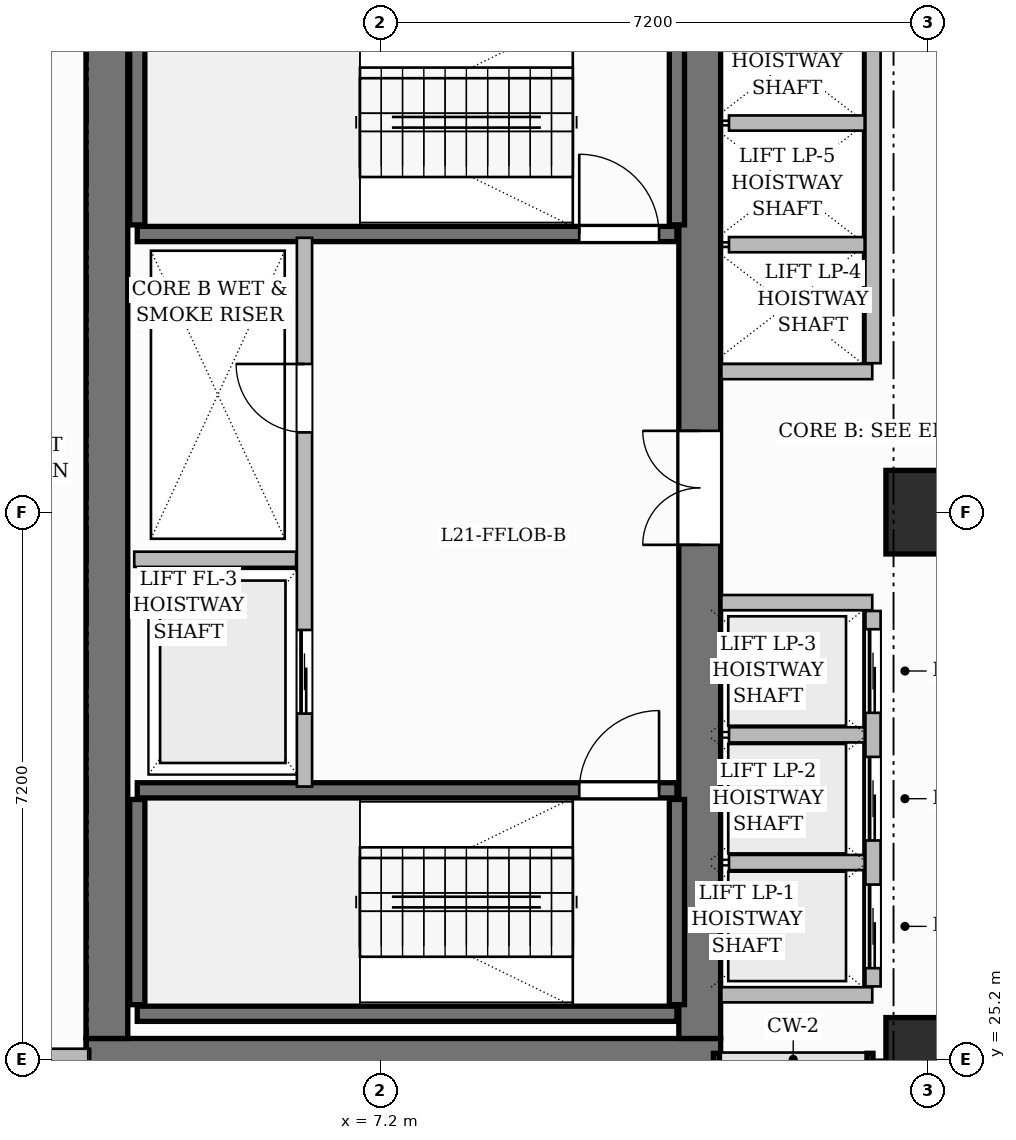
"""IFC4 building model, lengths in metres.
Left out: names, types, materials, properties, quantities, classifications, styles, units other than length and angle.
Written with IfcOpenShell. Run it as: python <this file> out.ifc"""

import sys

from ifc_helpers import new_model, si_unit, direction, frame, frame_2d, origin, origin_2d, place, context, subcontext, project, spatial, rectangle, extrude, source, transform, mapped, element, fill, save


model = new_model("IFC4")
c1 = context("Model", 3, precision=1e-05, world=origin(), true_north=direction((0.0, 1.0)))
c2 = subcontext(c1, "Body", "Model", "MODEL_VIEW")
j1 = project(units=[si_unit("LENGTHUNIT", "METRE"), si_unit("PLANEANGLEUNIT", "RADIAN")], contexts=[c1])
p1 = place(None, origin())
s1 = spatial("IfcSite", under=j1, at=p1, CompositionType="ELEMENT")
p2 = place(p1, origin())
s2 = spatial("IfcBuilding", under=s1, at=p2, CompositionType="ELEMENT")
p3 = place(p2, frame((0.0, 0.0, 87.9)))
s3 = spatial("IfcBuildingStorey", under=s2, at=p3, CompositionType="ELEMENT", Elevation=87.9)
p4 = place(p3, frame((3.325, 25.2, 0.0), z_axis=(0.0, 0.0, 1.0), x_axis=(1.0, 0.0, 0.0)))
e1 = element("IfcWall", 1, at=p4, inside=s3, PredefinedType="SHEAR", context=c2, shape_type="SweptSolid", body=[
    extrude(rectangle(XDim=8.35, YDim=0.55, at=frame_2d((4.175, 0.0))), origin(), (0.0, 0.0, 1.0), 3.7),
])
p5 = place(p3, frame((3.6, 25.475, 0.0), z_axis=(0.0, 0.0, 1.0), x_axis=(0.0, 1.0, 0.0)))
e2 = element("IfcWall", 2, at=p5, inside=s3, PredefinedType="SHEAR", context=c2, shape_type="SweptSolid", body=[
    extrude(rectangle(XDim=13.85, YDim=0.55, at=frame_2d((6.925, 0.0))), origin(), (0.0, 0.0, 1.0), 3.7),
])
p6 = place(p3, frame((11.4, 25.475, 0.0), z_axis=(0.0, 0.0, 1.0), x_axis=(0.0, 1.0, 0.0)))
e3 = element("IfcWall", 3, at=p6, inside=s3, PredefinedType="SHEAR", context=c2, shape_type="SweptSolid", body=[
    extrude(rectangle(XDim=13.85, YDim=0.55, at=frame_2d((6.925, 0.0))), origin(), (0.0, 0.0, 1.0), 3.7),
])
p7 = place(p6, frame((6.495, 0.0, 0.0)))
e4 = element("IfcOpeningElement", 4, at=p7, cuts=e3, PredefinedType="OPENING", context=c2, shape_type="SweptSolid", body=[
    extrude(rectangle(XDim=1.5, YDim=2.2, at=frame_2d((0.75, 1.1))), frame((0.0, 0.285, 0.0), z_axis=(0.0, -1.0, 0.0), x_axis=(1.0, 0.0, 0.0)), (0.0, 0.0, 1.0), 0.57),
])
m1 = source(origin(), c2, "Body", "SweptSolid", [
    extrude(rectangle(XDim=1.1, YDim=1.1, at=origin_2d()), origin(), (0.0, 0.0, 1.0), 3.7),
])
for number, where, z_axis, x_axis in (
    (5, (14.4, 25.2, 0.0), (0.0, 0.0, 1.0), (1.0, 0.0, 0.0)),
    (6, (14.4, 32.4, 0.0), (0.0, 0.0, 1.0), (1.0, 0.0, 0.0)),
):
    element("IfcColumn", number, at=place(p3, frame(where, z_axis=z_axis, x_axis=x_axis)), inside=s3, PredefinedType="COLUMN", context=c2, shape_type="MappedRepresentation", body=[
        mapped(m1, transform((0.0, 0.0, 0.0), scale=1.0)),
    ])
p8 = place(p3, frame((4.0, 25.8, 0.0), z_axis=(0.0, 0.0, 1.0), x_axis=(1.0, 0.0, 0.0)))
e7 = element("IfcWall", 7, at=p8, inside=s3, PredefinedType="SHEAR", context=c2, shape_type="SweptSolid", body=[
    extrude(rectangle(XDim=7.1, YDim=0.2, at=frame_2d((3.55, 0.0))), origin(), (0.0, 0.0, 1.0), 3.7),
])
for number, where, z_axis, x_axis in (
    (8, (4.0, 25.92, 0.0), (0.0, 0.0, 1.0), (0.0, 1.0, 0.0)),
    (9, (11.1, 25.92, 0.0), (0.0, 0.0, 1.0), (0.0, 1.0, 0.0)),
):
    element("IfcWall", number, at=place(p3, frame(where, z_axis=z_axis, x_axis=x_axis)), inside=s3, PredefinedType="SHEAR", context=c2, shape_type="SweptSolid", body=[
        extrude(rectangle(XDim=2.7, YDim=0.2, at=frame_2d((1.35, 0.0))), origin(), (0.0, 0.0, 1.0), 3.7),
    ])
p9 = place(p3, frame((4.0, 28.74, 0.0), z_axis=(0.0, 0.0, 1.0), x_axis=(1.0, 0.0, 0.0)))
e10 = element("IfcWall", 10, at=p9, inside=s3, PredefinedType="SHEAR", context=c2, shape_type="SweptSolid", body=[
    extrude(rectangle(XDim=7.1, YDim=0.2, at=frame_2d((3.55, 0.0))), origin(), (0.0, 0.0, 1.0), 3.7),
])
p10 = place(p9, frame((5.815, 0.0, 0.0)))
e11 = element("IfcOpeningElement", 11, at=p10, cuts=e10, PredefinedType="OPENING", context=c2, shape_type="SweptSolid", body=[
    extrude(rectangle(XDim=1.05, YDim=2.2, at=frame_2d((0.525, 1.1))), frame((0.0, 0.11, 0.0), z_axis=(0.0, -1.0, 0.0), x_axis=(1.0, 0.0, 0.0)), (0.0, 0.0, 1.0), 0.22),
])
for number, where, z_axis, x_axis in (
    (12, (4.0, 36.18, 0.0), (0.0, 0.0, 1.0), (0.0, 1.0, 0.0)),
    (13, (11.1, 36.18, 0.0), (0.0, 0.0, 1.0), (0.0, 1.0, 0.0)),
):
    element("IfcWall", number, at=place(p3, frame(where, z_axis=z_axis, x_axis=x_axis)), inside=s3, PredefinedType="SHEAR", context=c2, shape_type="SweptSolid", body=[
        extrude(rectangle(XDim=2.7, YDim=0.2, at=frame_2d((1.35, 0.0))), origin(), (0.0, 0.0, 1.0), 3.7),
    ])
p11 = place(p3, frame((4.0, 36.06, 0.0), z_axis=(0.0, 0.0, 1.0), x_axis=(1.0, 0.0, 0.0)))
e14 = element("IfcWall", 14, at=p11, inside=s3, PredefinedType="SHEAR", context=c2, shape_type="SweptSolid", body=[
    extrude(rectangle(XDim=7.1, YDim=0.2, at=frame_2d((3.55, 0.0))), origin(), (0.0, 0.0, 1.0), 3.7),
])
p12 = place(p11, frame((5.815, 0.0, 0.0)))
e15 = element("IfcOpeningElement", 15, at=p12, cuts=e14, PredefinedType="OPENING", context=c2, shape_type="SweptSolid", body=[
    extrude(rectangle(XDim=1.05, YDim=2.2, at=frame_2d((0.525, 1.1))), frame((0.0, 0.11, 0.0), z_axis=(0.0, -1.0, 0.0), x_axis=(1.0, 0.0, 0.0)), (0.0, 0.0, 1.0), 0.22),
])
p13 = place(p3, frame((6.2, 28.79, 0.0), z_axis=(0.0, 0.0, 1.0), x_axis=(0.0, 1.0, 0.0)))
e16 = element("IfcWall", 16, at=p13, inside=s3, PredefinedType="PARTITIONING", context=c2, shape_type="SweptSolid", body=[
    extrude(rectangle(XDim=7.22, YDim=0.2, at=frame_2d((3.61, 0.0))), origin(), (0.0, 0.0, 1.0), 3.45),
])
p14 = place(p13, frame((4.66, 0.0, 0.0)))
e17 = element("IfcOpeningElement", 17, at=p14, cuts=e16, PredefinedType="OPENING", context=c2, shape_type="SweptSolid", body=[
    extrude(rectangle(XDim=0.9, YDim=2.1, at=frame_2d((0.45, 1.05))), frame((0.0, 0.11, 0.0), z_axis=(0.0, -1.0, 0.0), x_axis=(1.0, 0.0, 0.0)), (0.0, 0.0, 1.0), 0.22),
])
p15 = place(p13, frame((0.96, 0.0, 0.0)))
e18 = element("IfcOpeningElement", 18, at=p15, cuts=e16, PredefinedType="OPENING", context=c2, shape_type="SweptSolid", body=[
    extrude(rectangle(XDim=1.1, YDim=2.2, at=frame_2d((0.55, 1.1))), frame((0.0, 0.11, 0.0), z_axis=(0.0, -1.0, 0.0), x_axis=(1.0, 0.0, 0.0)), (0.0, 0.0, 1.0), 0.22),
])
p16 = place(p3, frame((3.96, 31.78, 0.0), z_axis=(0.0, 0.0, 1.0), x_axis=(1.0, 0.0, 0.0)))
e19 = element("IfcWall", 19, at=p16, inside=s3, PredefinedType="PARTITIONING", context=c2, shape_type="SweptSolid", body=[
    extrude(rectangle(XDim=2.13, YDim=0.2, at=frame_2d((1.065, 0.0))), origin(), (0.0, 0.0, 1.0), 3.45),
])
for number, where, z_axis, x_axis in (
    (20, (11.685, 26.05, 0.0), (0.0, 0.0, 1.0), (1.0, 0.0, 0.0)),
    (21, (11.685, 31.21, 0.0), (0.0, 0.0, 1.0), (1.0, 0.0, 0.0)),
):
    element("IfcWall", number, at=place(p3, frame(where, z_axis=z_axis, x_axis=x_axis)), inside=s3, PredefinedType="PARTITIONING", context=c2, shape_type="SweptSolid", body=[
        extrude(rectangle(XDim=1.985, YDim=0.2, at=frame_2d((0.992, 0.0))), origin(), (0.0, 0.0, 1.0), 3.45),
    ])
p17 = place(p3, frame((13.68, 26.16, 0.0), z_axis=(0.0, 0.0, 1.0), x_axis=(0.0, 1.0, 0.0)))
e22 = element("IfcWall", 22, at=p17, inside=s3, PredefinedType="PARTITIONING", context=c2, shape_type="SweptSolid", body=[
    extrude(rectangle(XDim=4.94, YDim=0.2, at=frame_2d((2.47, 0.0))), origin(), (0.0, 0.0, 1.0), 3.45),
])
p18 = place(p17, frame((0.24, 0.0, 0.0)))
e23 = element("IfcOpeningElement", 23, at=p18, cuts=e22, PredefinedType="OPENING", context=c2, shape_type="SweptSolid", body=[
    extrude(rectangle(XDim=1.1, YDim=2.2, at=frame_2d((0.55, 1.1))), frame((0.0, 0.11, 0.0), z_axis=(0.0, -1.0, 0.0), x_axis=(1.0, 0.0, 0.0)), (0.0, 0.0, 1.0), 0.22),
])
p19 = place(p17, frame((1.92, 0.0, 0.0)))
e24 = element("IfcOpeningElement", 24, at=p19, cuts=e22, PredefinedType="OPENING", context=c2, shape_type="SweptSolid", body=[
    extrude(rectangle(XDim=1.1, YDim=2.2, at=frame_2d((0.55, 1.1))), frame((0.0, 0.11, 0.0), z_axis=(0.0, -1.0, 0.0), x_axis=(1.0, 0.0, 0.0)), (0.0, 0.0, 1.0), 0.22),
])
p20 = place(p17, frame((3.6, 0.0, 0.0)))
e25 = element("IfcOpeningElement", 25, at=p20, cuts=e22, PredefinedType="OPENING", context=c2, shape_type="SweptSolid", body=[
    extrude(rectangle(XDim=1.1, YDim=2.2, at=frame_2d((0.55, 1.1))), frame((0.0, 0.11, 0.0), z_axis=(0.0, -1.0, 0.0), x_axis=(1.0, 0.0, 0.0)), (0.0, 0.0, 1.0), 0.22),
])
for number, where, z_axis, x_axis in (
    (26, (11.785, 27.79, 0.0), (0.0, 0.0, 1.0), (1.0, 0.0, 0.0)),
    (27, (11.785, 29.47, 0.0), (0.0, 0.0, 1.0), (1.0, 0.0, 0.0)),
):
    element("IfcWall", number, at=place(p3, frame(where, z_axis=z_axis, x_axis=x_axis)), inside=s3, PredefinedType="PARTITIONING", context=c2, shape_type="SweptSolid", body=[
        extrude(rectangle(XDim=1.785, YDim=0.2, at=frame_2d((0.893, 0.0))), origin(), (0.0, 0.0, 1.0), 3.45),
    ])
p21 = place(p3, frame((11.685, 34.25, 0.0), z_axis=(0.0, 0.0, 1.0), x_axis=(1.0, 0.0, 0.0)))
e28 = element("IfcWall", 28, at=p21, inside=s3, PredefinedType="PARTITIONING", context=c2, shape_type="SweptSolid", body=[
    extrude(rectangle(XDim=1.985, YDim=0.2, at=frame_2d((0.992, 0.0))), origin(), (0.0, 0.0, 1.0), 3.45),
])
p22 = place(p3, frame((13.68, 34.36, 0.0), z_axis=(0.0, 0.0, 1.0), x_axis=(0.0, 1.0, 0.0)))
e29 = element("IfcWall", 29, at=p22, inside=s3, PredefinedType="PARTITIONING", context=c2, shape_type="SweptSolid", body=[
    extrude(rectangle(XDim=4.72, YDim=0.2, at=frame_2d((2.36, 0.0))), origin(), (0.0, 0.0, 1.0), 3.45),
])
for number, where, z_axis, x_axis in (
    (30, (11.785, 35.92, 0.0), (0.0, 0.0, 1.0), (1.0, 0.0, 0.0)),
    (31, (11.785, 37.52, 0.0), (0.0, 0.0, 1.0), (1.0, 0.0, 0.0)),
):
    element("IfcWall", number, at=place(p3, frame(where, z_axis=z_axis, x_axis=x_axis)), inside=s3, PredefinedType="PARTITIONING", context=c2, shape_type="SweptSolid", body=[
        extrude(rectangle(XDim=1.785, YDim=0.2, at=frame_2d((0.893, 0.0))), origin(), (0.0, 0.0, 1.0), 3.45),
    ])
p23 = place(p3, frame((0.0, 25.2, 0.0), z_axis=(0.0, 0.0, 1.0), x_axis=(1.0, 0.0, 0.0)))
e32 = element("IfcWall", 32, at=p23, inside=s3, PredefinedType="SOLIDWALL", context=c2, shape_type="SweptSolid", body=[
    extrude(rectangle(XDim=3.38, YDim=0.28, at=frame_2d((1.69, 0.0))), origin(), (0.0, 0.0, 1.0), 3.45),
])
p24 = place(p23, frame((1.205, 0.0, 0.8)))
e33 = element("IfcOpeningElement", 33, at=p24, cuts=e32, PredefinedType="OPENING", context=c2, shape_type="SweptSolid", body=[
    extrude(rectangle(XDim=1.4, YDim=1.85, at=frame_2d((0.7, 0.925))), frame((0.0, 0.15, 0.0), z_axis=(0.0, -1.0, 0.0), x_axis=(1.0, 0.0, 0.0)), (0.0, 0.0, 1.0), 0.3),
])
m2 = source(origin(), c2, "Body", "SweptSolid", [
    extrude(rectangle(XDim=1.05, YDim=2.2, at=frame_2d((0.525, 1.1))), frame((0.0, 0.025, 0.0), z_axis=(0.0, -1.0, 0.0), x_axis=(1.0, 0.0, 0.0)), (0.0, 0.0, 1.0), 0.05),
])
p25 = place(p10, origin())
e34 = element("IfcDoor", 34, at=p25, inside=s3, OperationType="SINGLE_SWING_RIGHT", PredefinedType="DOOR", context=c2, shape_type="MappedRepresentation", body=[
    mapped(m2, transform((0.0, 0.0, 0.0), scale=1.0)),
])
fill(e11, e34)
p26 = place(p12, origin())
e35 = element("IfcDoor", 35, at=p26, inside=s3, OperationType="SINGLE_SWING_LEFT", PredefinedType="DOOR", context=c2, shape_type="MappedRepresentation", body=[
    mapped(m2, transform((0.0, 0.0, 0.0), scale=1.0)),
])
fill(e15, e35)
m3 = source(origin(), c2, "Body", "SweptSolid", [
    extrude(rectangle(XDim=0.9, YDim=2.1, at=frame_2d((0.45, 1.05))), frame((0.0, 0.025, 0.0), z_axis=(0.0, -1.0, 0.0), x_axis=(1.0, 0.0, 0.0)), (0.0, 0.0, 1.0), 0.05),
])
p27 = place(p14, origin())
e36 = element("IfcDoor", 36, at=p27, inside=s3, OperationType="SINGLE_SWING_RIGHT", PredefinedType="DOOR", context=c2, shape_type="MappedRepresentation", body=[
    mapped(m3, transform((0.0, 0.0, 0.0), scale=1.0)),
])
fill(e17, e36)
m4 = source(origin(), c2, "Body", "SweptSolid", [
    extrude(rectangle(XDim=1.5, YDim=2.2, at=frame_2d((0.75, 1.1))), frame((0.0, 0.025, 0.0), z_axis=(0.0, -1.0, 0.0), x_axis=(1.0, 0.0, 0.0)), (0.0, 0.0, 1.0), 0.05),
])
p28 = place(p7, origin())
e37 = element("IfcDoor", 37, at=p28, inside=s3, OperationType="DOUBLE_DOOR_SINGLE_SWING", PredefinedType="DOOR", context=c2, shape_type="MappedRepresentation", body=[
    mapped(m4, transform((0.0, 0.0, 0.0), scale=1.0)),
])
fill(e4, e37)
m5 = source(origin(), c2, "Body", "SweptSolid", [
    extrude(rectangle(XDim=1.1, YDim=2.2, at=frame_2d((0.55, 1.1))), frame((0.0, 0.025, 0.0), z_axis=(0.0, -1.0, 0.0), x_axis=(1.0, 0.0, 0.0)), (0.0, 0.0, 1.0), 0.05),
])
p29 = place(p15, origin())
e38 = element("IfcDoor", 38, at=p29, inside=s3, OperationType="SLIDING_TO_LEFT", PredefinedType="DOOR", context=c2, shape_type="MappedRepresentation", body=[
    mapped(m5, transform((0.0, 0.0, 0.0), scale=1.0)),
])
fill(e18, e38)
p30 = place(p18, origin())
e39 = element("IfcDoor", 39, at=p30, inside=s3, OperationType="SLIDING_TO_LEFT", PredefinedType="DOOR", context=c2, shape_type="MappedRepresentation", body=[
    mapped(m5, transform((0.0, 0.0, 0.0), scale=1.0)),
])
fill(e23, e39)
p31 = place(p19, origin())
e40 = element("IfcDoor", 40, at=p31, inside=s3, OperationType="SLIDING_TO_LEFT", PredefinedType="DOOR", context=c2, shape_type="MappedRepresentation", body=[
    mapped(m5, transform((0.0, 0.0, 0.0), scale=1.0)),
])
fill(e24, e40)
p32 = place(p20, origin())
e41 = element("IfcDoor", 41, at=p32, inside=s3, OperationType="SLIDING_TO_LEFT", PredefinedType="DOOR", context=c2, shape_type="MappedRepresentation", body=[
    mapped(m5, transform((0.0, 0.0, 0.0), scale=1.0)),
])
fill(e25, e41)
save(model, sys.argv[1])
